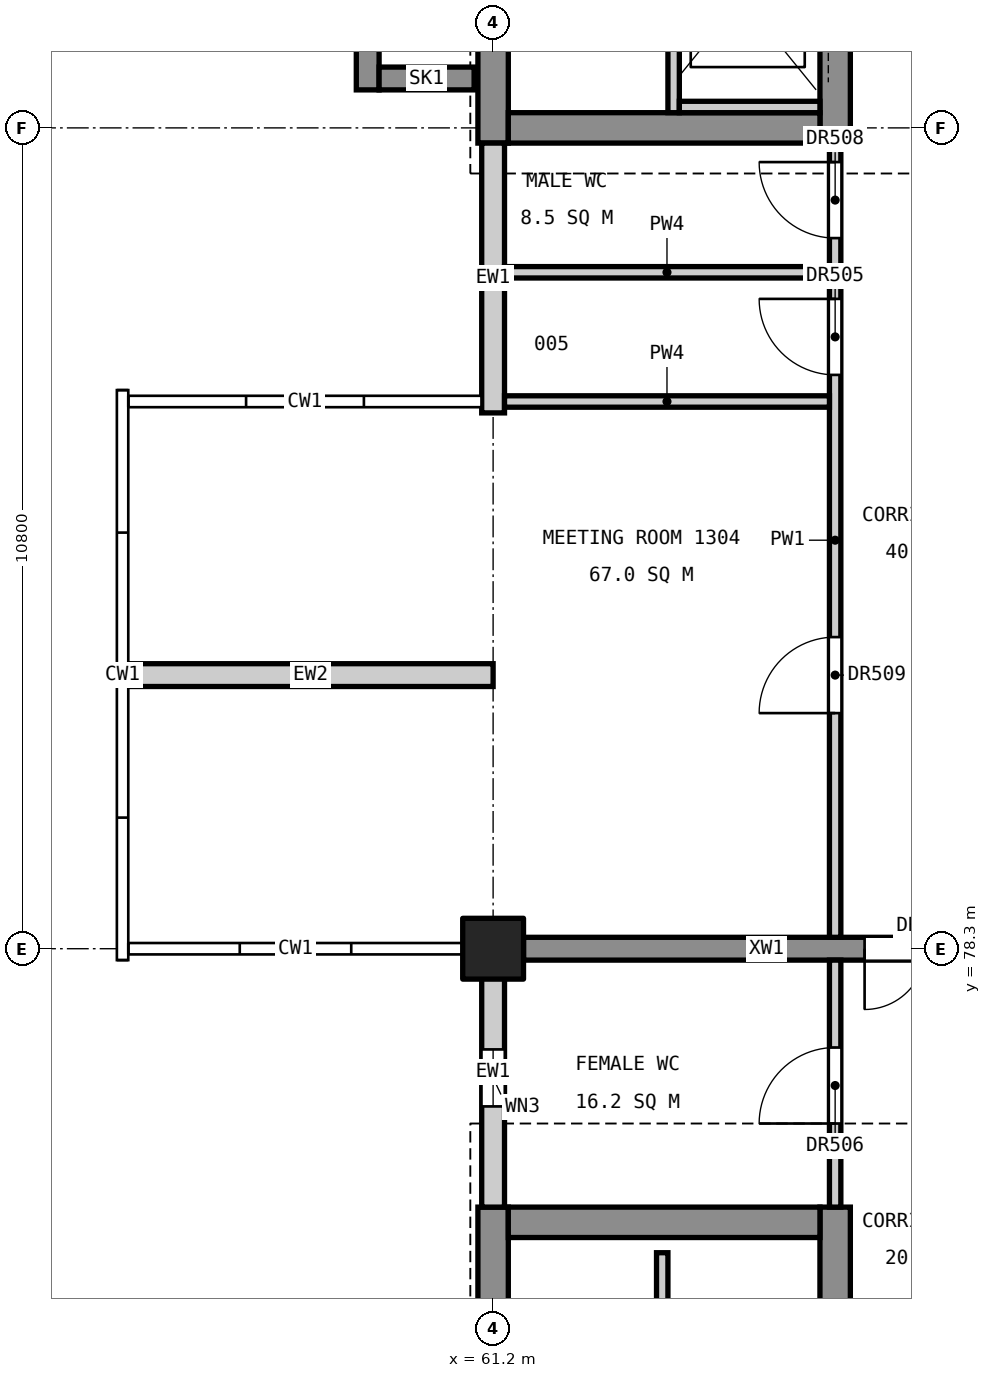
"""IFC4 building model, lengths in metres.
Left out: names, types, materials, properties, quantities, classifications, styles, units other than length and angle.
Written with IfcOpenShell. Run it as: python <this file> out.ifc"""

import sys

from ifc_helpers import new_model, si_unit, direction, frame, frame_2d, origin, origin_2d, place, context, subcontext, project, spatial, rectangle, extrude, element, fill, save


model = new_model("IFC4")
c1 = context("Model", 3, precision=1e-05, world=origin(), true_north=direction((0.0, 1.0)))
c2 = subcontext(c1, "Body", "Model", "MODEL_VIEW")
j1 = project(units=[si_unit("LENGTHUNIT", "METRE"), si_unit("PLANEANGLEUNIT", "RADIAN")], contexts=[c1])
p1 = place(None, origin())
s1 = spatial("IfcSite", under=j1, at=p1, CompositionType="ELEMENT")
p2 = place(p1, origin())
s2 = spatial("IfcBuilding", under=s1, at=p2, CompositionType="ELEMENT")
p3 = place(p2, frame((0.0, 0.0, 65.4)))
s3 = spatial("IfcBuildingStorey", under=s2, at=p3, CompositionType="ELEMENT", Elevation=65.4)
p4 = place(p3, frame((61.2, 78.3, 0.0), z_axis=(0.0, 0.0, 1.0), x_axis=(1.0, 0.0, 0.0)))
e1 = element("IfcColumn", 1, at=p4, inside=s3, PredefinedType="COLUMN", context=c2, shape_type="SweptSolid", body=[
    extrude(rectangle(XDim=0.8, YDim=0.8, at=origin_2d()), origin(), (0.0, 0.0, 1.0), 4.8),
])
p5 = place(p3, frame((61.2, 60.1, 0.0), z_axis=(0.0, 0.0, 1.0), x_axis=(0.0, 1.0, 0.0)))
e2 = element("IfcWall", 2, at=p5, inside=s3, PredefinedType="SHEAR", context=c2, shape_type="SweptSolid", body=[
    extrude(rectangle(XDim=14.8, YDim=0.4, at=frame_2d((7.4, 0.0))), origin(), (0.0, 0.0, 1.0), 4.55),
])
p6 = place(p5, frame((6.11, 0.0, 3.4)))
e3 = element("IfcOpeningElement", 3, at=p6, cuts=e2, PredefinedType="OPENING", context=c2, shape_type="SweptSolid", body=[
    extrude(rectangle(XDim=1.2, YDim=0.9, at=frame_2d((0.6, 0.45))), frame((0.0, 0.21, 0.0), z_axis=(0.0, -1.0, 0.0), x_axis=(1.0, 0.0, 0.0)), (0.0, 0.0, 1.0), 0.42),
])
p7 = place(p3, frame((65.7, 60.1, 0.0), z_axis=(0.0, 0.0, 1.0), x_axis=(0.0, 1.0, 0.0)))
e4 = element("IfcWall", 4, at=p7, inside=s3, PredefinedType="SHEAR", context=c2, shape_type="SweptSolid", body=[
    extrude(rectangle(XDim=14.8, YDim=0.4, at=frame_2d((7.4, 0.0))), origin(), (0.0, 0.0, 1.0), 4.55),
])
p8 = place(p7, frame((0.5, 0.0, 0.0)))
e5 = element("IfcOpeningElement", 5, at=p8, cuts=e4, PredefinedType="OPENING", context=c2, shape_type="SweptSolid", body=[
    extrude(rectangle(XDim=1.4, YDim=2.1, at=frame_2d((0.7, 1.05))), frame((0.0, 0.21, 0.0), z_axis=(0.0, -1.0, 0.0), x_axis=(1.0, 0.0, 0.0)), (0.0, 0.0, 1.0), 0.42),
])
p9 = place(p7, frame((8.8, 0.0, 0.0)))
e6 = element("IfcOpeningElement", 6, at=p9, cuts=e4, PredefinedType="OPENING", context=c2, shape_type="SweptSolid", body=[
    extrude(rectangle(XDim=1.1, YDim=2.1, at=frame_2d((0.55, 1.05))), frame((0.0, 0.21, 0.0), z_axis=(0.0, -1.0, 0.0), x_axis=(1.0, 0.0, 0.0)), (0.0, 0.0, 1.0), 0.42),
])
p10 = place(p7, frame((11.35, 0.0, 0.0)))
e7 = element("IfcOpeningElement", 7, at=p10, cuts=e4, PredefinedType="OPENING", context=c2, shape_type="SweptSolid", body=[
    extrude(rectangle(XDim=1.1, YDim=2.1, at=frame_2d((0.55, 1.05))), frame((0.0, 0.21, 0.0), z_axis=(0.0, -1.0, 0.0), x_axis=(1.0, 0.0, 0.0)), (0.0, 0.0, 1.0), 0.42),
])
p11 = place(p3, frame((61.4, 74.7, 0.0), z_axis=(0.0, 0.0, 1.0), x_axis=(1.0, 0.0, 0.0)))
e8 = element("IfcWall", 8, at=p11, inside=s3, PredefinedType="SHEAR", context=c2, shape_type="SweptSolid", body=[
    extrude(rectangle(XDim=4.1, YDim=0.4, at=frame_2d((2.05, 0.0))), origin(), (0.0, 0.0, 1.0), 4.55),
])
p12 = place(p3, frame((61.2, 88.9, 0.0), z_axis=(0.0, 0.0, 1.0), x_axis=(0.0, 1.0, 0.0)))
e9 = element("IfcWall", 9, at=p12, inside=s3, PredefinedType="SHEAR", context=c2, shape_type="SweptSolid", body=[
    extrude(rectangle(XDim=11.2, YDim=0.4, at=frame_2d((5.6, 0.0))), origin(), (0.0, 0.0, 1.0), 4.55),
])
p13 = place(p12, frame((3.89, 0.0, 3.4)))
e10 = element("IfcOpeningElement", 10, at=p13, cuts=e9, PredefinedType="OPENING", context=c2, shape_type="SweptSolid", body=[
    extrude(rectangle(XDim=1.2, YDim=0.9, at=frame_2d((0.6, 0.45))), frame((0.0, 0.21, 0.0), z_axis=(0.0, -1.0, 0.0), x_axis=(1.0, 0.0, 0.0)), (0.0, 0.0, 1.0), 0.42),
])
p14 = place(p3, frame((65.7, 88.9, 0.0), z_axis=(0.0, 0.0, 1.0), x_axis=(0.0, 1.0, 0.0)))
e11 = element("IfcWall", 11, at=p14, inside=s3, PredefinedType="SHEAR", context=c2, shape_type="SweptSolid", body=[
    extrude(rectangle(XDim=11.2, YDim=0.4, at=frame_2d((5.6, 0.0))), origin(), (0.0, 0.0, 1.0), 4.55),
])
p15 = place(p14, frame((9.3, 0.0, 0.0)))
e12 = element("IfcOpeningElement", 12, at=p15, cuts=e11, PredefinedType="OPENING", context=c2, shape_type="SweptSolid", body=[
    extrude(rectangle(XDim=1.4, YDim=2.1, at=frame_2d((0.7, 1.05))), frame((0.0, 0.21, 0.0), z_axis=(0.0, -1.0, 0.0), x_axis=(1.0, 0.0, 0.0)), (0.0, 0.0, 1.0), 0.42),
])
p16 = place(p14, frame((1.35, 0.0, 0.0)))
e13 = element("IfcOpeningElement", 13, at=p16, cuts=e11, PredefinedType="OPENING", context=c2, shape_type="SweptSolid", body=[
    extrude(rectangle(XDim=1.1, YDim=2.1, at=frame_2d((0.55, 1.05))), frame((0.0, 0.21, 0.0), z_axis=(0.0, -1.0, 0.0), x_axis=(1.0, 0.0, 0.0)), (0.0, 0.0, 1.0), 0.42),
])
p17 = place(p3, frame((61.4, 89.1, 0.0), z_axis=(0.0, 0.0, 1.0), x_axis=(1.0, 0.0, 0.0)))
e14 = element("IfcWall", 14, at=p17, inside=s3, PredefinedType="SHEAR", context=c2, shape_type="SweptSolid", body=[
    extrude(rectangle(XDim=4.1, YDim=0.4, at=frame_2d((2.05, 0.0))), origin(), (0.0, 0.0, 1.0), 4.55),
])
p18 = place(p3, frame((59.55, 89.6, 0.0), z_axis=(0.0, 0.0, 1.0), x_axis=(0.0, 1.0, 0.0)))
e15 = element("IfcWall", 15, at=p18, inside=s3, PredefinedType="SHEAR", context=c2, shape_type="SweptSolid", body=[
    extrude(rectangle(XDim=2.4, YDim=0.3, at=frame_2d((1.2, 0.0))), origin(), (0.0, 0.0, 1.0), 4.8),
])
p19 = place(p3, frame((60.95, 89.75, 0.0), z_axis=(0.0, 0.0, 1.0), x_axis=(-1.0, 0.0, 0.0)))
e16 = element("IfcWall", 16, at=p19, inside=s3, PredefinedType="SHEAR", context=c2, shape_type="SweptSolid", body=[
    extrude(rectangle(XDim=1.25, YDim=0.3, at=frame_2d((0.625, 0.0))), origin(), (0.0, 0.0, 1.0), 4.8),
])
p20 = place(p3, frame((61.6, 78.3, 0.0), z_axis=(0.0, 0.0, 1.0), x_axis=(1.0, 0.0, 0.0)))
e17 = element("IfcWall", 17, at=p20, inside=s3, PredefinedType="SHEAR", context=c2, shape_type="SweptSolid", body=[
    extrude(rectangle(XDim=6.4, YDim=0.3, at=frame_2d((3.2, 0.0))), origin(), (0.0, 0.0, 1.0), 4.55),
])
p21 = place(p20, frame((4.488, 0.0, 0.0)))
e18 = element("IfcOpeningElement", 18, at=p21, cuts=e17, PredefinedType="OPENING", context=c2, shape_type="SweptSolid", body=[
    extrude(rectangle(XDim=1.6, YDim=2.1, at=frame_2d((0.8, 1.05))), frame((0.0, 0.16, 0.0), z_axis=(0.0, -1.0, 0.0), x_axis=(1.0, 0.0, 0.0)), (0.0, 0.0, 1.0), 0.32),
])
p22 = place(p3, frame((63.575, 92.0, 0.0), z_axis=(0.0, 0.0, 1.0), x_axis=(0.0, -1.0, 0.0)))
e19 = element("IfcWall", 19, at=p22, inside=s3, PredefinedType="SOLIDWALL", context=c2, shape_type="SweptSolid", body=[
    extrude(rectangle(XDim=2.7, YDim=0.15, at=frame_2d((1.35, 0.0))), origin(), (0.0, 0.0, 1.0), 4.8),
])
p23 = place(p3, frame((63.65, 89.375, 0.0), z_axis=(0.0, 0.0, 1.0), x_axis=(1.0, 0.0, 0.0)))
e20 = element("IfcWall", 20, at=p23, inside=s3, PredefinedType="SOLIDWALL", context=c2, shape_type="SweptSolid", body=[
    extrude(rectangle(XDim=1.85, YDim=0.15, at=frame_2d((0.925, 0.0))), origin(), (0.0, 0.0, 1.0), 4.8),
])
p24 = place(p3, frame((63.425, 73.3, 0.0), z_axis=(0.0, 0.0, 1.0), x_axis=(0.0, 1.0, 0.0)))
e21 = element("IfcWall", 21, at=p24, inside=s3, PredefinedType="SOLIDWALL", context=c2, shape_type="SweptSolid", body=[
    extrude(rectangle(XDim=1.0, YDim=0.15, at=frame_2d((0.5, 0.0))), origin(), (0.0, 0.0, 1.0), 4.8),
])
p25 = place(p3, frame((61.2, 74.9, 0.0), z_axis=(0.0, 0.0, 1.0), x_axis=(0.0, 1.0, 0.0)))
e22 = element("IfcWall", 22, at=p25, inside=s3, PredefinedType="STANDARD", context=c2, shape_type="SweptSolid", body=[
    extrude(rectangle(XDim=3.55, YDim=0.3, at=frame_2d((1.775, 0.0))), origin(), (0.0, 0.0, 1.0), 3.65),
])
p26 = place(p25, frame((1.325, 0.0, 0.8)))
e23 = element("IfcOpeningElement", 23, at=p26, cuts=e22, PredefinedType="OPENING", context=c2, shape_type="SweptSolid", body=[
    extrude(rectangle(XDim=0.75, YDim=1.2, at=frame_2d((0.375, 0.6))), frame((0.0, 0.16, 0.0), z_axis=(0.0, -1.0, 0.0), x_axis=(1.0, 0.0, 0.0)), (0.0, 0.0, 1.0), 0.32),
])
p27 = place(p3, frame((61.2, 85.35, 0.0), z_axis=(0.0, 0.0, 1.0), x_axis=(0.0, 1.0, 0.0)))
e24 = element("IfcWall", 24, at=p27, inside=s3, PredefinedType="STANDARD", context=c2, shape_type="SweptSolid", body=[
    extrude(rectangle(XDim=3.55, YDim=0.3, at=frame_2d((1.775, 0.0))), origin(), (0.0, 0.0, 1.0), 3.65),
])
p28 = place(p3, frame((56.4, 81.9, 0.0), z_axis=(0.0, 0.0, 1.0), x_axis=(1.0, 0.0, 0.0)))
e25 = element("IfcWall", 25, at=p28, inside=s3, PredefinedType="STANDARD", context=c2, shape_type="SweptSolid", body=[
    extrude(rectangle(XDim=4.8, YDim=0.3, at=frame_2d((2.4, 0.0))), origin(), (0.0, 0.0, 1.0), 3.65),
])
p29 = place(p3, frame((65.7, 74.9, 0.0), z_axis=(0.0, 0.0, 1.0), x_axis=(0.0, 1.0, 0.0)))
e26 = element("IfcWall", 26, at=p29, inside=s3, PredefinedType="PARTITIONING", context=c2, shape_type="SweptSolid", body=[
    extrude(rectangle(XDim=3.25, YDim=0.15, at=frame_2d((1.625, 0.0))), origin(), (0.0, 0.0, 1.0), 3.55),
])
p30 = place(p29, frame((1.1, 0.0, 0.0)))
e27 = element("IfcOpeningElement", 27, at=p30, cuts=e26, PredefinedType="OPENING", context=c2, shape_type="SweptSolid", body=[
    extrude(rectangle(XDim=1.0, YDim=2.1, at=frame_2d((0.5, 1.05))), frame((0.0, 0.085, 0.0), z_axis=(0.0, -1.0, 0.0), x_axis=(1.0, 0.0, 0.0)), (0.0, 0.0, 1.0), 0.17),
])
p31 = place(p3, frame((65.7, 78.45, 0.0), z_axis=(0.0, 0.0, 1.0), x_axis=(0.0, 1.0, 0.0)))
e28 = element("IfcWall", 28, at=p31, inside=s3, PredefinedType="PARTITIONING", context=c2, shape_type="SweptSolid", body=[
    extrude(rectangle(XDim=10.45, YDim=0.15, at=frame_2d((5.225, 0.0))), origin(), (0.0, 0.0, 1.0), 3.55),
])
p32 = place(p31, frame((7.4, 0.0, 0.0)))
e29 = element("IfcOpeningElement", 29, at=p32, cuts=e28, PredefinedType="OPENING", context=c2, shape_type="SweptSolid", body=[
    extrude(rectangle(XDim=1.0, YDim=2.1, at=frame_2d((0.5, 1.05))), frame((0.0, 0.085, 0.0), z_axis=(0.0, -1.0, 0.0), x_axis=(1.0, 0.0, 0.0)), (0.0, 0.0, 1.0), 0.17),
])
p33 = place(p31, frame((9.2, 0.0, 0.0)))
e30 = element("IfcOpeningElement", 30, at=p33, cuts=e28, PredefinedType="OPENING", context=c2, shape_type="SweptSolid", body=[
    extrude(rectangle(XDim=1.0, YDim=2.1, at=frame_2d((0.5, 1.05))), frame((0.0, 0.085, 0.0), z_axis=(0.0, -1.0, 0.0), x_axis=(1.0, 0.0, 0.0)), (0.0, 0.0, 1.0), 0.17),
])
p34 = place(p31, frame((2.95, 0.0, 0.0)))
e31 = element("IfcOpeningElement", 31, at=p34, cuts=e28, PredefinedType="OPENING", context=c2, shape_type="SweptSolid", body=[
    extrude(rectangle(XDim=1.0, YDim=2.1, at=frame_2d((0.5, 1.05))), frame((0.0, 0.085, 0.0), z_axis=(0.0, -1.0, 0.0), x_axis=(1.0, 0.0, 0.0)), (0.0, 0.0, 1.0), 0.17),
])
p35 = place(p3, frame((61.35, 85.5, 0.0), z_axis=(0.0, 0.0, 1.0), x_axis=(1.0, 0.0, 0.0)))
e32 = element("IfcWall", 32, at=p35, inside=s3, PredefinedType="PARTITIONING", context=c2, shape_type="SweptSolid", body=[
    extrude(rectangle(XDim=4.275, YDim=0.15, at=frame_2d((2.137, 0.0))), origin(), (0.0, 0.0, 1.0), 3.85),
])
p36 = place(p3, frame((61.35, 87.2, 0.0), z_axis=(0.0, 0.0, 1.0), x_axis=(1.0, 0.0, 0.0)))
e33 = element("IfcWall", 33, at=p36, inside=s3, PredefinedType="PARTITIONING", context=c2, shape_type="SweptSolid", body=[
    extrude(rectangle(XDim=4.275, YDim=0.15, at=frame_2d((2.137, 0.0))), origin(), (0.0, 0.0, 1.0), 3.55),
])
p37 = place(p26, origin())
e34 = element("IfcWindow", 34, at=p37, inside=s3, PartitioningType="SINGLE_PANEL", PredefinedType="WINDOW", context=c2, shape_type="SweptSolid", body=[
    extrude(rectangle(XDim=0.75, YDim=1.2, at=frame_2d((0.375, 0.6))), frame((0.0, 0.03, 0.0), z_axis=(0.0, -1.0, 0.0), x_axis=(1.0, 0.0, 0.0)), (0.0, 0.0, 1.0), 0.06),
])
fill(e23, e34)
p38 = place(p32, origin())
e35 = element("IfcDoor", 35, at=p38, inside=s3, OperationType="SINGLE_SWING_RIGHT", PredefinedType="DOOR", context=c2, shape_type="SweptSolid", body=[
    extrude(rectangle(XDim=1.0, YDim=2.1, at=frame_2d((0.5, 1.05))), frame((0.0, 0.025, 0.0), z_axis=(0.0, -1.0, 0.0), x_axis=(1.0, 0.0, 0.0)), (0.0, 0.0, 1.0), 0.05),
])
fill(e29, e35)
p39 = place(p30, origin())
e36 = element("IfcDoor", 36, at=p39, inside=s3, OperationType="SINGLE_SWING_LEFT", PredefinedType="DOOR", context=c2, shape_type="SweptSolid", body=[
    extrude(rectangle(XDim=1.0, YDim=2.1, at=frame_2d((0.5, 1.05))), frame((0.0, 0.025, 0.0), z_axis=(0.0, -1.0, 0.0), x_axis=(1.0, 0.0, 0.0)), (0.0, 0.0, 1.0), 0.05),
])
fill(e27, e36)
p40 = place(p33, origin())
e37 = element("IfcDoor", 37, at=p40, inside=s3, OperationType="SINGLE_SWING_RIGHT", PredefinedType="DOOR", context=c2, shape_type="SweptSolid", body=[
    extrude(rectangle(XDim=1.0, YDim=2.1, at=frame_2d((0.5, 1.05))), frame((0.0, 0.025, 0.0), z_axis=(0.0, -1.0, 0.0), x_axis=(1.0, 0.0, 0.0)), (0.0, 0.0, 1.0), 0.05),
])
fill(e30, e37)
p41 = place(p34, origin())
e38 = element("IfcDoor", 38, at=p41, inside=s3, OperationType="SINGLE_SWING_LEFT", PredefinedType="DOOR", context=c2, shape_type="SweptSolid", body=[
    extrude(rectangle(XDim=1.0, YDim=2.1, at=frame_2d((0.5, 1.05))), frame((0.0, 0.025, 0.0), z_axis=(0.0, -1.0, 0.0), x_axis=(1.0, 0.0, 0.0)), (0.0, 0.0, 1.0), 0.05),
])
fill(e31, e38)
p42 = place(p21, frame((1.6, 0.0, 0.0), z_axis=(0.0, 0.0, 1.0), x_axis=(-1.0, 0.0, 0.0)))
e39 = element("IfcDoor", 39, at=p42, inside=s3, OperationType="DOUBLE_DOOR_SINGLE_SWING", PredefinedType="DOOR", context=c2, shape_type="SweptSolid", body=[
    extrude(rectangle(XDim=1.6, YDim=2.1, at=frame_2d((0.8, 1.05))), frame((0.0, 0.025, 0.0), z_axis=(0.0, -1.0, 0.0), x_axis=(1.0, 0.0, 0.0)), (0.0, 0.0, 1.0), 0.05),
])
fill(e18, e39)
save(model, sys.argv[1])
